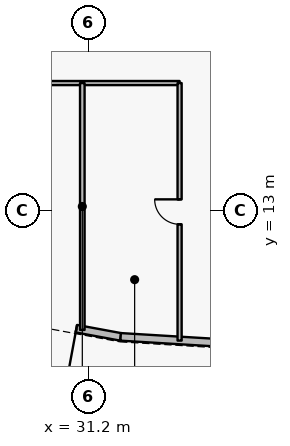
"""IFC4 building model, lengths in metres.
Left out: names, types, materials, properties, quantities, classifications, styles, units other than length and angle.
Written with IfcOpenShell. Run it as: python <this file> out.ifc"""

import sys

from ifc_helpers import new_model, si_unit, direction, frame, frame_2d, origin, origin_2d, place, context, subcontext, project, spatial, rectangle, extrude, source, transform, mapped, element, fill, save


model = new_model("IFC4")
c1 = context("Model", 3, precision=1e-05, world=origin(), true_north=direction((0.0, 1.0)))
c2 = subcontext(c1, "Body", "Model", "MODEL_VIEW")
j1 = project(units=[si_unit("LENGTHUNIT", "METRE"), si_unit("PLANEANGLEUNIT", "RADIAN")], contexts=[c1])
p1 = place(None, origin())
s1 = spatial("IfcSite", under=j1, at=p1, CompositionType="ELEMENT")
p2 = place(p1, origin())
s2 = spatial("IfcBuilding", under=s1, at=p2, CompositionType="ELEMENT")
p3 = place(p2, origin())
s3 = spatial("IfcBuildingStorey", under=s2, at=p3, CompositionType="ELEMENT", Elevation=0.0)
p4 = place(p3, frame((32.261, 8.852, 0.0), z_axis=(0.0, 0.0, 1.0), x_axis=(-0.983306878602, 0.181954891374, 0.0)))
e1 = element("IfcWall", 1, at=p4, inside=s3, PredefinedType="SOLIDWALL", context=c2, shape_type="SweptSolid", body=[
    extrude(rectangle(XDim=3.709, YDim=0.25, at=frame_2d((1.854, 0.0))), origin(), (0.0, 0.0, 1.0), 5.7),
])
p5 = place(p4, frame((1.481, 0.0, 0.0)))
e2 = element("IfcOpeningElement", 2, at=p5, cuts=e1, PredefinedType="OPENING", context=c2, shape_type="SweptSolid", body=[
    extrude(rectangle(XDim=1.8, YDim=2.2, at=origin_2d()), frame((0.9, 0.135, 1.1), z_axis=(0.0, -1.0, 0.0), x_axis=(1.0, 0.0, 0.0)), (0.0, 0.0, 1.0), 0.27),
])
p6 = place(p3, frame((36.0, 8.625, 0.0), z_axis=(0.0, 0.0, 1.0), x_axis=(-0.99816551411, 0.060544251933, 0.0)))
e3 = element("IfcWall", 3, at=p6, inside=s3, PredefinedType="SOLIDWALL", context=c2, shape_type="SweptSolid", body=[
    extrude(rectangle(XDim=3.746, YDim=0.25, at=frame_2d((1.873, 0.0))), origin(), (0.0, 0.0, 1.0), 4.885),
])
p7 = place(p3, frame((23.0, 17.2, 0.0), z_axis=(0.0, 0.0, 1.0), x_axis=(1.0, 0.0, 0.0)))
e4 = element("IfcWall", 4, at=p7, inside=s3, PredefinedType="PARTITIONING", context=c2, shape_type="SweptSolid", body=[
    extrude(rectangle(XDim=11.2, YDim=0.135, at=frame_2d((5.6, 0.0))), origin(), (0.0, 0.0, 1.0), 4.885),
])
p8 = place(p7, frame((5.59, 0.0, 0.0)))
e5 = element("IfcOpeningElement", 5, at=p8, cuts=e4, PredefinedType="OPENING", context=c2, shape_type="SweptSolid", body=[
    extrude(rectangle(XDim=0.82, YDim=2.1, at=origin_2d()), frame((0.41, 0.078, 1.05), z_axis=(0.0, -1.0, 0.0), x_axis=(1.0, 0.0, 0.0)), (0.0, 0.0, 1.0), 0.155),
])
p9 = place(p3, frame((31.0, 9.08, 0.0), z_axis=(0.0, 0.0, 1.0), x_axis=(0.0, 1.0, 0.0)))
e6 = element("IfcWall", 6, at=p9, inside=s3, PredefinedType="PARTITIONING", context=c2, shape_type="SweptSolid", body=[
    extrude(rectangle(XDim=8.12, YDim=0.15, at=frame_2d((4.06, 0.0))), origin(), (0.0, 0.0, 1.0), 5.7),
])
p10 = place(p3, frame((34.2, 8.729, 0.0), z_axis=(0.0, 0.0, 1.0), x_axis=(0.0, 1.0, 0.0)))
e7 = element("IfcWall", 7, at=p10, inside=s3, PredefinedType="PARTITIONING", context=c2, shape_type="SweptSolid", body=[
    extrude(rectangle(XDim=8.471, YDim=0.135, at=frame_2d((4.235, 0.0))), origin(), (0.0, 0.0, 1.0), 5.7),
])
p11 = place(p10, frame((3.825, 0.0, 0.0)))
e8 = element("IfcOpeningElement", 8, at=p11, cuts=e7, PredefinedType="OPENING", context=c2, shape_type="SweptSolid", body=[
    extrude(rectangle(XDim=0.82, YDim=2.1, at=origin_2d()), frame((0.41, 0.078, 1.05), z_axis=(0.0, -1.0, 0.0), x_axis=(1.0, 0.0, 0.0)), (0.0, 0.0, 1.0), 0.155),
])
m1 = source(origin(), c2, "Body", "SweptSolid", [
    extrude(rectangle(XDim=1.8, YDim=2.2, at=origin_2d()), frame((0.9, 0.025, 1.1), z_axis=(0.0, -1.0, 0.0), x_axis=(1.0, 0.0, 0.0)), (0.0, 0.0, 1.0), 0.05),
])
p12 = place(p5, origin())
e9 = element("IfcDoor", 9, at=p12, inside=s3, OperationType="SINGLE_SWING_LEFT", PredefinedType="DOOR", context=c2, shape_type="MappedRepresentation", body=[
    mapped(m1, transform((0.0, 0.0, 0.0), x_axis=(1.0, 0.0, 0.0), y_axis=(0.0, 1.0, 0.0), z_axis=(0.0, 0.0, 1.0), scale=1.0)),
])
fill(e2, e9)
m2 = source(origin(), c2, "Body", "SweptSolid", [
    extrude(rectangle(XDim=0.82, YDim=2.1, at=origin_2d()), frame((0.41, 0.025, 1.05), z_axis=(0.0, -1.0, 0.0), x_axis=(1.0, 0.0, 0.0)), (0.0, 0.0, 1.0), 0.05),
])
p13 = place(p11, origin())
e10 = element("IfcDoor", 10, at=p13, inside=s3, OperationType="SINGLE_SWING_RIGHT", PredefinedType="DOOR", context=c2, shape_type="MappedRepresentation", body=[
    mapped(m2, transform((0.0, 0.0, 0.0), x_axis=(1.0, 0.0, 0.0), y_axis=(0.0, 1.0, 0.0), z_axis=(0.0, 0.0, 1.0), scale=1.0)),
])
fill(e8, e10)
save(model, sys.argv[1])
